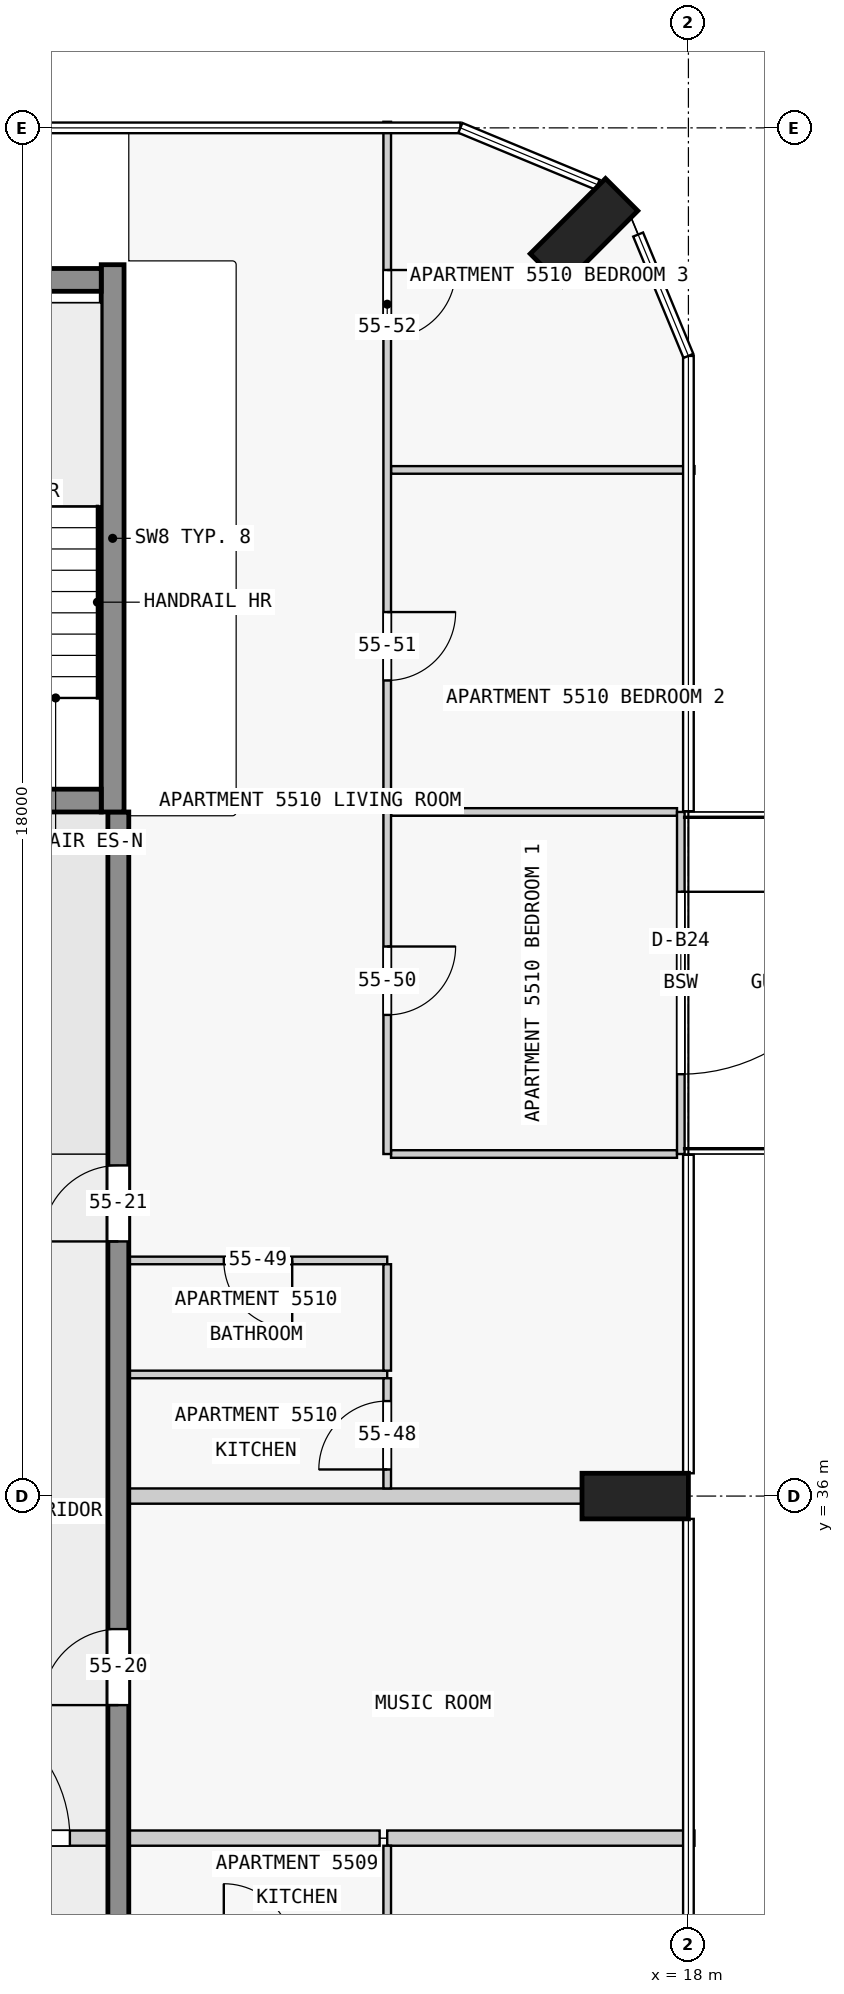
"""IFC4 building model, lengths in metres.
Left out: names, types, materials, properties, quantities, classifications, styles, units other than length and angle.
Written with IfcOpenShell. Run it as: python <this file> out.ifc"""

import sys

from ifc_helpers import new_model, si_unit, direction, frame, frame_2d, origin, origin_2d, place, context, subcontext, project, spatial, rectangle, extrude, element, fill, save


model = new_model("IFC4")
c1 = context("Model", 3, precision=1e-05, world=origin(), true_north=direction((0.0, 1.0)))
c2 = subcontext(c1, "Body", "Model", "MODEL_VIEW")
j1 = project(units=[si_unit("LENGTHUNIT", "METRE"), si_unit("PLANEANGLEUNIT", "RADIAN")], contexts=[c1])
p1 = place(None, origin())
s1 = spatial("IfcSite", under=j1, at=p1, CompositionType="ELEMENT")
p2 = place(p1, origin())
s2 = spatial("IfcBuilding", under=s1, at=p2, CompositionType="ELEMENT")
p3 = place(p2, frame((0.0, 0.0, 211.9)))
s3 = spatial("IfcBuildingStorey", under=s2, at=p3, CompositionType="ELEMENT", Elevation=211.9)
for number, where, z_axis, x_axis in (
    (1, (17.3, 36.0, 0.0), (0.0, 0.0, 1.0), (0.0, 1.0, 0.0)),
    (2, (16.626, 52.626, 0.0), (0.0, 0.0, 1.0), (-0.707, 0.707, 0.0)),
):
    element("IfcColumn", number, at=place(p3, frame(where, z_axis=z_axis, x_axis=x_axis)), inside=s3, PredefinedType="COLUMN", context=c2, shape_type="SweptSolid", body=[
        extrude(rectangle(XDim=0.6, YDim=1.4, at=origin_2d()), origin(), (0.0, 0.0, 1.0), 3.5),
    ])
p4 = place(p3, frame((7.725, 45.15, 0.0), z_axis=(0.0, 0.0, 1.0), x_axis=(1.0, 0.0, 0.0)))
e3 = element("IfcWall", 3, at=p4, inside=s3, PredefinedType="SHEAR", context=c2, shape_type="SweptSolid", body=[
    extrude(rectangle(XDim=2.55, YDim=0.3, at=frame_2d((1.275, 0.0))), origin(), (0.0, 0.0, 1.0), 3.5),
])
p5 = place(p4, frame((0.725, 0.0, 0.0)))
e4 = element("IfcOpeningElement", 4, at=p5, cuts=e3, PredefinedType="OPENING", context=c2, shape_type="SweptSolid", body=[
    extrude(rectangle(XDim=1.1, YDim=2.1, at=frame_2d((0.55, 1.05))), frame((0.0, 0.16, 0.0), z_axis=(0.0, -1.0, 0.0), x_axis=(1.0, 0.0, 0.0)), (0.0, 0.0, 1.0), 0.32),
])
p6 = place(p3, frame((7.725, 52.0, 0.0), z_axis=(0.0, 0.0, 1.0), x_axis=(1.0, 0.0, 0.0)))
e5 = element("IfcWall", 5, at=p6, inside=s3, PredefinedType="SHEAR", context=c2, shape_type="SweptSolid", body=[
    extrude(rectangle(XDim=2.55, YDim=0.3, at=frame_2d((1.275, 0.0))), origin(), (0.0, 0.0, 1.0), 3.5),
])
p7 = place(p3, frame((10.425, 45.0, 0.0), z_axis=(0.0, 0.0, 1.0), x_axis=(0.0, 1.0, 0.0)))
e6 = element("IfcWall", 6, at=p7, inside=s3, PredefinedType="SHEAR", context=c2, shape_type="SweptSolid", body=[
    extrude(rectangle(XDim=7.2, YDim=0.3, at=frame_2d((3.6, 0.0))), origin(), (0.0, 0.0, 1.0), 3.5),
])
p8 = place(p3, frame((10.5, 18.0, 0.0), z_axis=(0.0, 0.0, 1.0), x_axis=(0.0, 1.0, 0.0)))
e7 = element("IfcWall", 7, at=p8, inside=s3, PredefinedType="SHEAR", context=c2, shape_type="SweptSolid", body=[
    extrude(rectangle(XDim=27.0, YDim=0.275, at=frame_2d((13.5, 0.0))), origin(), (0.0, 0.0, 1.0), 3.25),
])
p9 = place(p8, frame((1.75, 0.0, 0.0)))
e8 = element("IfcOpeningElement", 8, at=p9, cuts=e7, PredefinedType="OPENING", context=c2, shape_type="SweptSolid", body=[
    extrude(rectangle(XDim=1.0, YDim=2.1, at=frame_2d((0.5, 1.05))), frame((0.0, 0.147, 0.0), z_axis=(0.0, -1.0, 0.0), x_axis=(1.0, 0.0, 0.0)), (0.0, 0.0, 1.0), 0.295),
])
p10 = place(p8, frame((6.25, 0.0, 0.0)))
e9 = element("IfcOpeningElement", 9, at=p10, cuts=e7, PredefinedType="OPENING", context=c2, shape_type="SweptSolid", body=[
    extrude(rectangle(XDim=1.0, YDim=2.1, at=frame_2d((0.5, 1.05))), frame((0.0, 0.147, 0.0), z_axis=(0.0, -1.0, 0.0), x_axis=(1.0, 0.0, 0.0)), (0.0, 0.0, 1.0), 0.295),
])
p11 = place(p8, frame((10.75, 0.0, 0.0)))
e10 = element("IfcOpeningElement", 10, at=p11, cuts=e7, PredefinedType="OPENING", context=c2, shape_type="SweptSolid", body=[
    extrude(rectangle(XDim=1.0, YDim=2.1, at=frame_2d((0.5, 1.05))), frame((0.0, 0.147, 0.0), z_axis=(0.0, -1.0, 0.0), x_axis=(1.0, 0.0, 0.0)), (0.0, 0.0, 1.0), 0.295),
])
p12 = place(p8, frame((15.25, 0.0, 0.0)))
e11 = element("IfcOpeningElement", 11, at=p12, cuts=e7, PredefinedType="OPENING", context=c2, shape_type="SweptSolid", body=[
    extrude(rectangle(XDim=1.0, YDim=2.1, at=frame_2d((0.5, 1.05))), frame((0.0, 0.147, 0.0), z_axis=(0.0, -1.0, 0.0), x_axis=(1.0, 0.0, 0.0)), (0.0, 0.0, 1.0), 0.295),
])
p13 = place(p8, frame((21.35, 0.0, 0.0)))
e12 = element("IfcOpeningElement", 12, at=p13, cuts=e7, PredefinedType="OPENING", context=c2, shape_type="SweptSolid", body=[
    extrude(rectangle(XDim=1.0, YDim=2.1, at=frame_2d((0.5, 1.05))), frame((0.0, 0.147, 0.0), z_axis=(0.0, -1.0, 0.0), x_axis=(1.0, 0.0, 0.0)), (0.0, 0.0, 1.0), 0.295),
])
p14 = place(p3, frame((17.9, 45.0, 0.0), z_axis=(0.0, 0.0, 1.0), x_axis=(0.0, -1.0, 0.0)))
e13 = element("IfcWall", 13, at=p14, inside=s3, PredefinedType="STANDARD", context=c2, shape_type="SweptSolid", body=[
    extrude(rectangle(XDim=4.5, YDim=0.1, at=frame_2d((2.25, 0.0))), origin(), (0.0, 0.0, 1.0), 3.25),
])
p15 = place(p14, frame((1.05, 0.0, 0.0)))
e14 = element("IfcOpeningElement", 14, at=p15, cuts=e13, PredefinedType="OPENING", context=c2, shape_type="SweptSolid", body=[
    extrude(rectangle(XDim=2.4, YDim=2.4, at=frame_2d((1.2, 1.2))), frame((0.0, 0.06, 0.0), z_axis=(0.0, -1.0, 0.0), x_axis=(1.0, 0.0, 0.0)), (0.0, 0.0, 1.0), 0.12),
])
p16 = place(p3, frame((13.938, 31.5, 0.0), z_axis=(0.0, 0.0, 1.0), x_axis=(-1.0, 0.0, 0.0)))
e15 = element("IfcWall", 15, at=p16, inside=s3, PredefinedType="PARTITIONING", context=c2, shape_type="SweptSolid", body=[
    extrude(rectangle(XDim=3.3, YDim=0.2, at=frame_2d((1.65, 0.0))), origin(), (0.0, 0.0, 1.0), 3.25),
])
p17 = place(p3, frame((14.038, 31.5, 0.0), z_axis=(0.0, 0.0, 1.0), x_axis=(1.0, 0.0, 0.0)))
e16 = element("IfcWall", 16, at=p17, inside=s3, PredefinedType="PARTITIONING", context=c2, shape_type="SweptSolid", body=[
    extrude(rectangle(XDim=4.042, YDim=0.2, at=frame_2d((2.021, 0.0))), origin(), (0.0, 0.0, 1.0), 3.25),
])
p18 = place(p3, frame((16.6, 36.0, 0.0), z_axis=(0.0, 0.0, 1.0), x_axis=(-1.0, 0.0, 0.0)))
e17 = element("IfcWall", 17, at=p18, inside=s3, PredefinedType="PARTITIONING", context=c2, shape_type="SweptSolid", body=[
    extrude(rectangle(XDim=5.963, YDim=0.2, at=frame_2d((2.981, 0.0))), origin(), (0.0, 0.0, 1.0), 3.25),
])
p19 = place(p3, frame((14.038, 37.6, 0.0), z_axis=(0.0, 0.0, 1.0), x_axis=(-1.0, 0.0, 0.0)))
e18 = element("IfcWall", 18, at=p19, inside=s3, PredefinedType="PARTITIONING", context=c2, shape_type="SweptSolid", body=[
    extrude(rectangle(XDim=3.4, YDim=0.1, at=frame_2d((1.7, 0.0))), origin(), (0.0, 0.0, 1.0), 3.25),
])
p20 = place(p3, frame((14.038, 39.1, 0.0), z_axis=(0.0, 0.0, 1.0), x_axis=(-1.0, 0.0, 0.0)))
e19 = element("IfcWall", 19, at=p20, inside=s3, PredefinedType="PARTITIONING", context=c2, shape_type="SweptSolid", body=[
    extrude(rectangle(XDim=3.4, YDim=0.1, at=frame_2d((1.7, 0.0))), origin(), (0.0, 0.0, 1.0), 3.25),
])
p21 = place(p20, frame((1.25, 0.0, 0.0)))
e20 = element("IfcOpeningElement", 20, at=p21, cuts=e19, PredefinedType="OPENING", context=c2, shape_type="SweptSolid", body=[
    extrude(rectangle(XDim=0.9, YDim=2.1, at=frame_2d((0.45, 1.05))), frame((0.0, 0.06, 0.0), z_axis=(0.0, -1.0, 0.0), x_axis=(1.0, 0.0, 0.0)), (0.0, 0.0, 1.0), 0.12),
])
for number, where, z_axis, x_axis in (
    (21, (14.087, 40.5, 0.0), (0.0, 0.0, 1.0), (1.0, 0.0, 0.0)),
    (22, (17.85, 45.0, 0.0), (0.0, 0.0, 1.0), (-1.0, 0.0, 0.0)),
):
    element("IfcWall", number, at=place(p3, frame(where, z_axis=z_axis, x_axis=x_axis)), inside=s3, PredefinedType="PARTITIONING", context=c2, shape_type="SweptSolid", body=[
        extrude(rectangle(XDim=3.763, YDim=0.1, at=frame_2d((1.881, 0.0))), origin(), (0.0, 0.0, 1.0), 3.25),
    ])
p22 = place(p3, frame((18.08, 49.5, 0.0), z_axis=(0.0, 0.0, 1.0), x_axis=(-1.0, 0.0, 0.0)))
e23 = element("IfcWall", 23, at=p22, inside=s3, PredefinedType="PARTITIONING", context=c2, shape_type="SweptSolid", body=[
    extrude(rectangle(XDim=3.993, YDim=0.1, at=frame_2d((1.996, 0.0))), origin(), (0.0, 0.0, 1.0), 3.25),
])
p23 = place(p3, frame((14.038, 54.08, 0.0), z_axis=(0.0, 0.0, 1.0), x_axis=(0.0, -1.0, 0.0)))
e24 = element("IfcWall", 24, at=p23, inside=s3, PredefinedType="PARTITIONING", context=c2, shape_type="SweptSolid", body=[
    extrude(rectangle(XDim=13.58, YDim=0.1, at=frame_2d((6.79, 0.0))), origin(), (0.0, 0.0, 1.0), 3.25),
])
p24 = place(p23, frame((10.85, 0.0, 0.0)))
e25 = element("IfcOpeningElement", 25, at=p24, cuts=e24, PredefinedType="OPENING", context=c2, shape_type="SweptSolid", body=[
    extrude(rectangle(XDim=0.9, YDim=2.1, at=frame_2d((0.45, 1.05))), frame((0.0, 0.06, 0.0), z_axis=(0.0, -1.0, 0.0), x_axis=(1.0, 0.0, 0.0)), (0.0, 0.0, 1.0), 0.12),
])
p25 = place(p23, frame((6.45, 0.0, 0.0)))
e26 = element("IfcOpeningElement", 26, at=p25, cuts=e24, PredefinedType="OPENING", context=c2, shape_type="SweptSolid", body=[
    extrude(rectangle(XDim=0.9, YDim=2.1, at=frame_2d((0.45, 1.05))), frame((0.0, 0.06, 0.0), z_axis=(0.0, -1.0, 0.0), x_axis=(1.0, 0.0, 0.0)), (0.0, 0.0, 1.0), 0.12),
])
p26 = place(p23, frame((1.95, 0.0, 0.0)))
e27 = element("IfcOpeningElement", 27, at=p26, cuts=e24, PredefinedType="OPENING", context=c2, shape_type="SweptSolid", body=[
    extrude(rectangle(XDim=0.9, YDim=2.1, at=frame_2d((0.45, 1.05))), frame((0.0, 0.06, 0.0), z_axis=(0.0, -1.0, 0.0), x_axis=(1.0, 0.0, 0.0)), (0.0, 0.0, 1.0), 0.12),
])
p27 = place(p3, frame((14.038, 30.05, 0.0), z_axis=(0.0, 0.0, 1.0), x_axis=(0.0, 1.0, 0.0)))
e28 = element("IfcWall", 28, at=p27, inside=s3, PredefinedType="PARTITIONING", context=c2, shape_type="SweptSolid", body=[
    extrude(rectangle(XDim=1.35, YDim=0.1, at=frame_2d((0.675, 0.0))), origin(), (0.0, 0.0, 1.0), 3.25),
])
p28 = place(p3, frame((14.038, 36.1, 0.0), z_axis=(0.0, 0.0, 1.0), x_axis=(0.0, 1.0, 0.0)))
e29 = element("IfcWall", 29, at=p28, inside=s3, PredefinedType="PARTITIONING", context=c2, shape_type="SweptSolid", body=[
    extrude(rectangle(XDim=1.45, YDim=0.1, at=frame_2d((0.725, 0.0))), origin(), (0.0, 0.0, 1.0), 3.25),
])
p29 = place(p28, frame((0.25, 0.0, 0.0)))
e30 = element("IfcOpeningElement", 30, at=p29, cuts=e29, PredefinedType="OPENING", context=c2, shape_type="SweptSolid", body=[
    extrude(rectangle(XDim=0.9, YDim=2.1, at=frame_2d((0.45, 1.05))), frame((0.0, 0.06, 0.0), z_axis=(0.0, -1.0, 0.0), x_axis=(1.0, 0.0, 0.0)), (0.0, 0.0, 1.0), 0.12),
])
p30 = place(p3, frame((14.038, 37.65, 0.0), z_axis=(0.0, 0.0, 1.0), x_axis=(0.0, 1.0, 0.0)))
e31 = element("IfcWall", 31, at=p30, inside=s3, PredefinedType="PARTITIONING", context=c2, shape_type="SweptSolid", body=[
    extrude(rectangle(XDim=1.4, YDim=0.1, at=frame_2d((0.7, 0.0))), origin(), (0.0, 0.0, 1.0), 3.25),
])
p31 = place(p3, frame((7.462, 31.5, 0.0), z_axis=(0.0, 0.0, 1.0), x_axis=(1.0, 0.0, 0.0)))
e32 = element("IfcWall", 32, at=p31, inside=s3, PredefinedType="PARTITIONING", context=c2, shape_type="SweptSolid", body=[
    extrude(rectangle(XDim=3.075, YDim=0.2, at=frame_2d((1.538, 0.0))), origin(), (0.0, 0.0, 1.0), 3.25),
])
p32 = place(p31, frame((0.6, 0.0, 0.0)))
e33 = element("IfcOpeningElement", 33, at=p32, cuts=e32, PredefinedType="OPENING", context=c2, shape_type="SweptSolid", body=[
    extrude(rectangle(XDim=1.8, YDim=2.1, at=frame_2d((0.9, 1.05))), frame((0.0, 0.11, 0.0), z_axis=(0.0, -1.0, 0.0), x_axis=(1.0, 0.0, 0.0)), (0.0, 0.0, 1.0), 0.22),
])
p33 = place(p15, origin())
e34 = element("IfcDoor", 34, at=p33, inside=s3, OperationType="SINGLE_SWING_LEFT", PredefinedType="DOOR", context=c2, shape_type="SweptSolid", body=[
    extrude(rectangle(XDim=2.4, YDim=2.4, at=frame_2d((1.2, 1.2))), frame((0.0, 0.025, 0.0), z_axis=(0.0, -1.0, 0.0), x_axis=(1.0, 0.0, 0.0)), (0.0, 0.0, 1.0), 0.05),
])
fill(e14, e34)
p34 = place(p12, origin())
e35 = element("IfcDoor", 35, at=p34, inside=s3, OperationType="SINGLE_SWING_RIGHT", PredefinedType="DOOR", context=c2, shape_type="SweptSolid", body=[
    extrude(rectangle(XDim=1.0, YDim=2.1, at=frame_2d((0.5, 1.05))), frame((0.0, 0.025, 0.0), z_axis=(0.0, -1.0, 0.0), x_axis=(1.0, 0.0, 0.0)), (0.0, 0.0, 1.0), 0.05),
])
fill(e11, e35)
p35 = place(p13, origin())
e36 = element("IfcDoor", 36, at=p35, inside=s3, OperationType="SINGLE_SWING_RIGHT", PredefinedType="DOOR", context=c2, shape_type="SweptSolid", body=[
    extrude(rectangle(XDim=1.0, YDim=2.1, at=frame_2d((0.5, 1.05))), frame((0.0, 0.025, 0.0), z_axis=(0.0, -1.0, 0.0), x_axis=(1.0, 0.0, 0.0)), (0.0, 0.0, 1.0), 0.05),
])
fill(e12, e36)
p36 = place(p32, origin())
e37 = element("IfcDoor", 37, at=p36, inside=s3, OperationType="SINGLE_SWING_LEFT", PredefinedType="DOOR", context=c2, shape_type="SweptSolid", body=[
    extrude(rectangle(XDim=1.8, YDim=2.1, at=frame_2d((0.9, 1.05))), frame((0.0, 0.025, 0.0), z_axis=(0.0, -1.0, 0.0), x_axis=(1.0, 0.0, 0.0)), (0.0, 0.0, 1.0), 0.05),
])
fill(e33, e37)
p37 = place(p29, origin())
e38 = element("IfcDoor", 38, at=p37, inside=s3, OperationType="SINGLE_SWING_LEFT", PredefinedType="DOOR", context=c2, shape_type="SweptSolid", body=[
    extrude(rectangle(XDim=0.9, YDim=2.1, at=frame_2d((0.45, 1.05))), frame((0.0, 0.025, 0.0), z_axis=(0.0, -1.0, 0.0), x_axis=(1.0, 0.0, 0.0)), (0.0, 0.0, 1.0), 0.05),
])
fill(e30, e38)
p38 = place(p21, origin())
e39 = element("IfcDoor", 39, at=p38, inside=s3, OperationType="SINGLE_SWING_LEFT", PredefinedType="DOOR", context=c2, shape_type="SweptSolid", body=[
    extrude(rectangle(XDim=0.9, YDim=2.1, at=frame_2d((0.45, 1.05))), frame((0.0, 0.025, 0.0), z_axis=(0.0, -1.0, 0.0), x_axis=(1.0, 0.0, 0.0)), (0.0, 0.0, 1.0), 0.05),
])
fill(e20, e39)
p39 = place(p24, origin())
e40 = element("IfcDoor", 40, at=p39, inside=s3, OperationType="SINGLE_SWING_RIGHT", PredefinedType="DOOR", context=c2, shape_type="SweptSolid", body=[
    extrude(rectangle(XDim=0.9, YDim=2.1, at=frame_2d((0.45, 1.05))), frame((0.0, 0.025, 0.0), z_axis=(0.0, -1.0, 0.0), x_axis=(1.0, 0.0, 0.0)), (0.0, 0.0, 1.0), 0.05),
])
fill(e25, e40)
p40 = place(p25, origin())
e41 = element("IfcDoor", 41, at=p40, inside=s3, OperationType="SINGLE_SWING_RIGHT", PredefinedType="DOOR", context=c2, shape_type="SweptSolid", body=[
    extrude(rectangle(XDim=0.9, YDim=2.1, at=frame_2d((0.45, 1.05))), frame((0.0, 0.025, 0.0), z_axis=(0.0, -1.0, 0.0), x_axis=(1.0, 0.0, 0.0)), (0.0, 0.0, 1.0), 0.05),
])
fill(e26, e41)
p41 = place(p26, origin())
e42 = element("IfcDoor", 42, at=p41, inside=s3, OperationType="SINGLE_SWING_LEFT", PredefinedType="DOOR", context=c2, shape_type="SweptSolid", body=[
    extrude(rectangle(XDim=0.9, YDim=2.1, at=frame_2d((0.45, 1.05))), frame((0.0, 0.025, 0.0), z_axis=(0.0, -1.0, 0.0), x_axis=(1.0, 0.0, 0.0)), (0.0, 0.0, 1.0), 0.05),
])
fill(e27, e42)
save(model, sys.argv[1])
